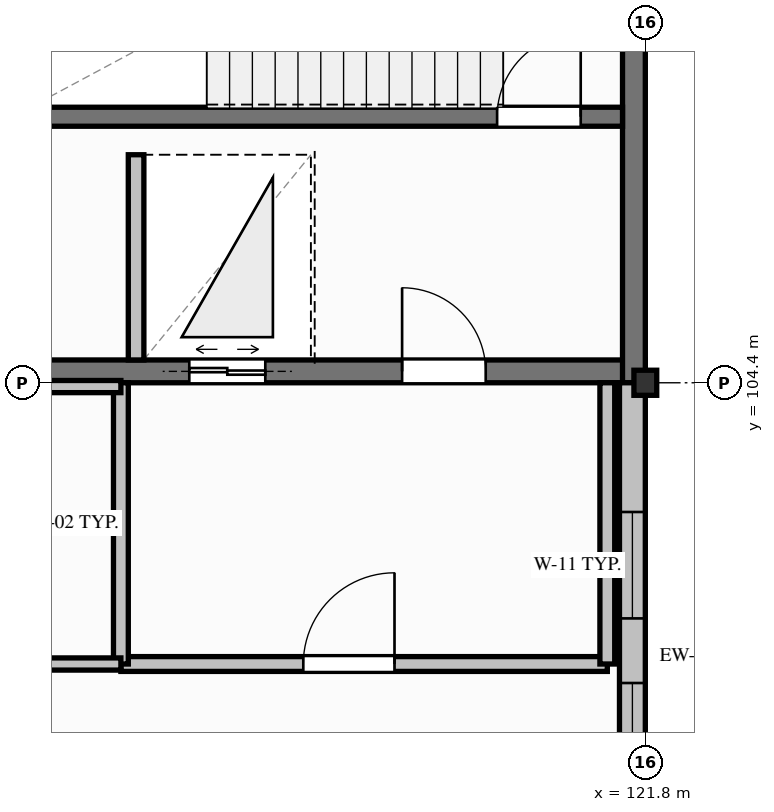
"""IFC4 building model, lengths in metres.
Left out: names, types, materials, properties, quantities, classifications, styles, units other than length and angle.
Written with IfcOpenShell. Run it as: python <this file> out.ifc"""

import sys

from ifc_helpers import new_model, si_unit, direction, frame, frame_2d, origin, origin_2d, place, context, subcontext, project, spatial, rectangle, i_section, extrude, element, fill, save


model = new_model("IFC4")
c1 = context("Model", 3, precision=1e-05, world=origin(), true_north=direction((0.0, 1.0)))
c2 = subcontext(c1, "Body", "Model", "MODEL_VIEW")
j1 = project(units=[si_unit("LENGTHUNIT", "METRE"), si_unit("PLANEANGLEUNIT", "RADIAN")], contexts=[c1])
p1 = place(None, origin())
s1 = spatial("IfcSite", under=j1, at=p1, CompositionType="ELEMENT")
p2 = place(p1, origin())
s2 = spatial("IfcBuilding", under=s1, at=p2, CompositionType="ELEMENT")
p3 = place(p2, frame((0.0, 0.0, 25.35)))
s3 = spatial("IfcBuildingStorey", under=s2, at=p3, CompositionType="ELEMENT", Elevation=25.35)
p4 = place(p3, frame((113.4, 104.55, 0.0), z_axis=(0.0, 0.0, 1.0), x_axis=(1.0, 0.0, 0.0)))
e1 = element("IfcWall", 1, at=p4, inside=s3, PredefinedType="SHEAR", context=c2, shape_type="SweptSolid", body=[
    extrude(rectangle(XDim=8.4, YDim=0.3, at=frame_2d((4.2, 0.0))), origin(), (0.0, 0.0, 1.0), 4.05),
])
p5 = place(p4, frame((5.2, 0.0, 0.0)))
e2 = element("IfcOpeningElement", 2, at=p5, cuts=e1, PredefinedType="OPENING", context=c2, shape_type="SweptSolid", body=[
    extrude(rectangle(XDim=1.1, YDim=2.15, at=frame_2d((0.55, 1.075))), frame((0.0, 0.16, 0.0), z_axis=(0.0, -1.0, 0.0), x_axis=(1.0, 0.0, 0.0)), (0.0, 0.0, 1.0), 0.32),
])
p6 = place(p4, frame((2.4, 0.0, 0.0)))
e3 = element("IfcOpeningElement", 3, at=p6, cuts=e1, PredefinedType="OPENING", context=c2, shape_type="SweptSolid", body=[
    extrude(rectangle(XDim=1.0, YDim=2.1, at=frame_2d((0.5, 1.05))), frame((0.0, 0.16, 0.0), z_axis=(0.0, -1.0, 0.0), x_axis=(1.0, 0.0, 0.0)), (0.0, 0.0, 1.0), 0.32),
])
p7 = place(p3, frame((121.65, 111.6, 0.0), z_axis=(0.0, 0.0, 1.0), x_axis=(0.0, -1.0, 0.0)))
e4 = element("IfcWall", 4, at=p7, inside=s3, PredefinedType="SHEAR", context=c2, shape_type="SweptSolid", body=[
    extrude(rectangle(XDim=7.2, YDim=0.3, at=frame_2d((3.6, 0.0))), origin(), (0.0, 0.0, 1.0), 4.05),
])
p8 = place(p3, frame((113.7, 107.9, 0.0), z_axis=(0.0, 0.0, 1.0), x_axis=(1.0, 0.0, 0.0)))
e5 = element("IfcWall", 5, at=p8, inside=s3, PredefinedType="SHEAR", context=c2, shape_type="SweptSolid", body=[
    extrude(rectangle(XDim=7.8, YDim=0.25, at=frame_2d((3.9, 0.0))), origin(), (0.0, 0.0, 1.0), 4.05),
])
p9 = place(p8, frame((6.15, 0.0, 0.0)))
e6 = element("IfcOpeningElement", 6, at=p9, cuts=e5, PredefinedType="OPENING", context=c2, shape_type="SweptSolid", body=[
    extrude(rectangle(XDim=1.1, YDim=2.15, at=frame_2d((0.55, 1.075))), frame((0.0, 0.135, 0.0), z_axis=(0.0, -1.0, 0.0), x_axis=(1.0, 0.0, 0.0)), (0.0, 0.0, 1.0), 0.27),
])
p10 = place(p3, frame((121.8, 104.4, 0.0), z_axis=(0.0, 0.0, 1.0), x_axis=(1.0, 0.0, 0.0)))
e7 = element("IfcColumn", 7, at=p10, inside=s3, PredefinedType="COLUMN", context=c2, shape_type="SweptSolid", body=[
    extrude(i_section(OverallWidth=0.3, OverallDepth=0.33, WebThickness=0.01, FlangeThickness=0.017, FilletRadius=0.027, at=origin_2d()), origin(), (0.0, 0.0, 1.0), 4.05),
])
p11 = place(p3, frame((121.63, 104.4, 0.0), z_axis=(0.0, 0.0, 1.0), x_axis=(0.0, -1.0, 0.0)))
e8 = element("IfcWall", 8, at=p11, inside=s3, PredefinedType="SOLIDWALL", context=c2, shape_type="SweptSolid", body=[
    extrude(rectangle(XDim=7.2, YDim=0.34, at=frame_2d((3.6, 0.0))), origin(), (0.0, 0.0, 1.0), 3.188),
])
p12 = place(p11, frame((1.7, 0.0, 0.85)))
e9 = element("IfcOpeningElement", 9, at=p12, cuts=e8, PredefinedType="OPENING", context=c2, shape_type="SweptSolid", body=[
    extrude(rectangle(XDim=1.4, YDim=1.65, at=frame_2d((0.7, 0.825))), frame((0.0, 0.18, 0.0), z_axis=(0.0, -1.0, 0.0), x_axis=(1.0, 0.0, 0.0)), (0.0, 0.0, 1.0), 0.36),
])
p13 = place(p11, frame((3.95, 0.0, 0.85)))
e10 = element("IfcOpeningElement", 10, at=p13, cuts=e8, PredefinedType="OPENING", context=c2, shape_type="SweptSolid", body=[
    extrude(rectangle(XDim=1.7, YDim=1.75, at=frame_2d((0.85, 0.875))), frame((0.0, 0.18, 0.0), z_axis=(0.0, -1.0, 0.0), x_axis=(1.0, 0.0, 0.0)), (0.0, 0.0, 1.0), 0.36),
])
p14 = place(p3, frame((115.1, 104.7, 0.0), z_axis=(0.0, 0.0, 1.0), x_axis=(0.0, 1.0, 0.0)))
e11 = element("IfcWall", 11, at=p14, inside=s3, PredefinedType="PARTITIONING", context=c2, shape_type="SweptSolid", body=[
    extrude(rectangle(XDim=2.7, YDim=0.205, at=frame_2d((1.35, 0.0))), origin(), (0.0, 0.0, 1.0), 3.538),
])
p15 = place(p3, frame((114.9, 100.7, 0.0), z_axis=(0.0, 0.0, 1.0), x_axis=(1.0, 0.0, 0.0)))
e12 = element("IfcWall", 12, at=p15, inside=s3, PredefinedType="PARTITIONING", context=c2, shape_type="SweptSolid", body=[
    extrude(rectangle(XDim=6.4, YDim=0.195, at=frame_2d((3.2, 0.0))), origin(), (0.0, 0.0, 1.0), 3.78),
])
p16 = place(p15, frame((2.4, 0.0, 0.0)))
e13 = element("IfcOpeningElement", 13, at=p16, cuts=e12, PredefinedType="OPENING", context=c2, shape_type="SweptSolid", body=[
    extrude(rectangle(XDim=1.2, YDim=2.15, at=frame_2d((0.6, 1.075))), frame((0.0, 0.107, 0.0), z_axis=(0.0, -1.0, 0.0), x_axis=(1.0, 0.0, 0.0)), (0.0, 0.0, 1.0), 0.215),
])
for number, where, z_axis, x_axis in (
    (14, (121.3, 100.7, 0.0), (0.0, 0.0, 1.0), (0.0, 1.0, 0.0)),
    (15, (114.9, 100.7, 0.0), (0.0, 0.0, 1.0), (0.0, 1.0, 0.0)),
):
    element("IfcWall", number, at=place(p3, frame(where, z_axis=z_axis, x_axis=x_axis)), inside=s3, PredefinedType="PARTITIONING", context=c2, shape_type="SweptSolid", body=[
        extrude(rectangle(XDim=3.7, YDim=0.195, at=frame_2d((1.85, 0.0))), origin(), (0.0, 0.0, 1.0), 3.538),
    ])
p17 = place(p3, frame((78.7, 100.7, 0.0), z_axis=(0.0, 0.0, 1.0), x_axis=(1.0, 0.0, 0.0)))
e16 = element("IfcWall", 16, at=p17, inside=s3, PredefinedType="PARTITIONING", context=c2, shape_type="SweptSolid", body=[
    extrude(rectangle(XDim=36.2, YDim=0.16, at=frame_2d((18.1, 0.0))), origin(), (0.0, 0.0, 1.0), 3.448),
])
p18 = place(p17, frame((5.8, 0.0, 0.0)))
e17 = element("IfcOpeningElement", 17, at=p18, cuts=e16, PredefinedType="OPENING", context=c2, shape_type="SweptSolid", body=[
    extrude(rectangle(XDim=1.12, YDim=2.18, at=frame_2d((0.56, 1.09))), frame((0.0, 0.09, 0.0), z_axis=(0.0, -1.0, 0.0), x_axis=(1.0, 0.0, 0.0)), (0.0, 0.0, 1.0), 0.18),
])
p19 = place(p17, frame((18.2, 0.0, 0.0)))
e18 = element("IfcOpeningElement", 18, at=p19, cuts=e16, PredefinedType="OPENING", context=c2, shape_type="SweptSolid", body=[
    extrude(rectangle(XDim=1.06, YDim=2.16, at=frame_2d((0.53, 1.08))), frame((0.0, 0.09, 0.0), z_axis=(0.0, -1.0, 0.0), x_axis=(1.0, 0.0, 0.0)), (0.0, 0.0, 1.0), 0.18),
])
p20 = place(p17, frame((29.2, 0.0, 0.0)))
e19 = element("IfcOpeningElement", 19, at=p20, cuts=e16, PredefinedType="OPENING", context=c2, shape_type="SweptSolid", body=[
    extrude(rectangle(XDim=1.36, YDim=2.2, at=frame_2d((0.68, 1.1))), frame((0.0, 0.09, 0.0), z_axis=(0.0, -1.0, 0.0), x_axis=(1.0, 0.0, 0.0)), (0.0, 0.0, 1.0), 0.18),
])
p21 = place(p3, frame((78.7, 104.35, 0.0), z_axis=(0.0, 0.0, 1.0), x_axis=(1.0, 0.0, 0.0)))
e20 = element("IfcWall", 20, at=p21, inside=s3, PredefinedType="PARTITIONING", context=c2, shape_type="SweptSolid", body=[
    extrude(rectangle(XDim=36.2, YDim=0.16, at=frame_2d((18.1, 0.0))), origin(), (0.0, 0.0, 1.0), 3.188),
])
p22 = place(p21, frame((16.23, 0.0, 0.0)))
e21 = element("IfcOpeningElement", 21, at=p22, cuts=e20, PredefinedType="OPENING", context=c2, shape_type="SweptSolid", body=[
    extrude(rectangle(XDim=1.24, YDim=2.2, at=frame_2d((0.62, 1.1))), frame((0.0, 0.09, 0.0), z_axis=(0.0, -1.0, 0.0), x_axis=(1.0, 0.0, 0.0)), (0.0, 0.0, 1.0), 0.18),
])
p23 = place(p12, origin())
e22 = element("IfcWindow", 22, at=p23, inside=s3, PartitioningType="SINGLE_PANEL", PredefinedType="WINDOW", context=c2, shape_type="SweptSolid", body=[
    extrude(rectangle(XDim=1.4, YDim=1.65, at=frame_2d((0.7, 0.825))), frame((0.0, 0.03, 0.0), z_axis=(0.0, -1.0, 0.0), x_axis=(1.0, 0.0, 0.0)), (0.0, 0.0, 1.0), 0.06),
])
fill(e9, e22)
p24 = place(p13, origin())
e23 = element("IfcWindow", 23, at=p24, inside=s3, PartitioningType="SINGLE_PANEL", PredefinedType="WINDOW", context=c2, shape_type="SweptSolid", body=[
    extrude(rectangle(XDim=1.7, YDim=1.75, at=frame_2d((0.85, 0.875))), frame((0.0, 0.03, 0.0), z_axis=(0.0, -1.0, 0.0), x_axis=(1.0, 0.0, 0.0)), (0.0, 0.0, 1.0), 0.06),
])
fill(e10, e23)
p25 = place(p9, origin())
e24 = element("IfcDoor", 24, at=p25, inside=s3, OperationType="SINGLE_SWING_RIGHT", PredefinedType="DOOR", context=c2, shape_type="SweptSolid", body=[
    extrude(rectangle(XDim=1.1, YDim=2.15, at=frame_2d((0.55, 1.075))), frame((0.0, 0.025, 0.0), z_axis=(0.0, -1.0, 0.0), x_axis=(1.0, 0.0, 0.0)), (0.0, 0.0, 1.0), 0.05),
])
fill(e6, e24)
p26 = place(p5, origin())
e25 = element("IfcDoor", 25, at=p26, inside=s3, OperationType="SINGLE_SWING_LEFT", PredefinedType="DOOR", context=c2, shape_type="SweptSolid", body=[
    extrude(rectangle(XDim=1.1, YDim=2.15, at=frame_2d((0.55, 1.075))), frame((0.0, 0.025, 0.0), z_axis=(0.0, -1.0, 0.0), x_axis=(1.0, 0.0, 0.0)), (0.0, 0.0, 1.0), 0.05),
])
fill(e2, e25)
p27 = place(p6, origin())
e26 = element("IfcDoor", 26, at=p27, inside=s3, OperationType="DOUBLE_DOOR_SLIDING", PredefinedType="DOOR", context=c2, shape_type="SweptSolid", body=[
    extrude(rectangle(XDim=1.0, YDim=2.1, at=frame_2d((0.5, 1.05))), frame((0.0, 0.025, 0.0), z_axis=(0.0, -1.0, 0.0), x_axis=(1.0, 0.0, 0.0)), (0.0, 0.0, 1.0), 0.05),
])
fill(e3, e26)
p28 = place(p16, origin())
e27 = element("IfcDoor", 27, at=p28, inside=s3, OperationType="SINGLE_SWING_RIGHT", PredefinedType="DOOR", context=c2, shape_type="SweptSolid", body=[
    extrude(rectangle(XDim=1.2, YDim=2.15, at=frame_2d((0.6, 1.075))), frame((0.0, 0.025, 0.0), z_axis=(0.0, -1.0, 0.0), x_axis=(1.0, 0.0, 0.0)), (0.0, 0.0, 1.0), 0.05),
])
fill(e13, e27)
save(model, sys.argv[1])
